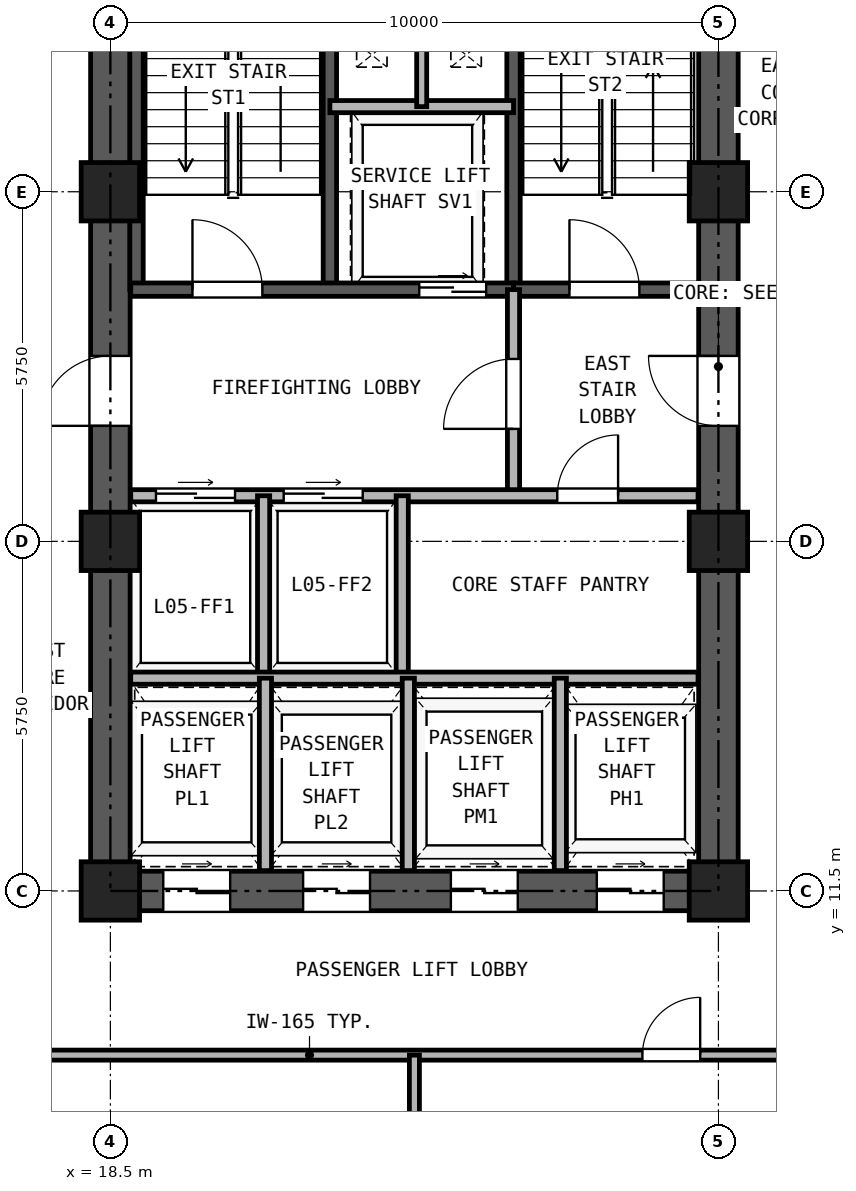
"""IFC4 building model, lengths in metres.
Left out: names, types, materials, properties, quantities, classifications, styles, units other than length and angle.
Written with IfcOpenShell. Run it as: python <this file> out.ifc"""

import sys

from ifc_helpers import new_model, si_unit, direction, frame, frame_2d, origin, origin_2d, place, context, subcontext, project, spatial, rectangle, hollow_rectangle, extrude, source, transform, mapped, element, fill, save


model = new_model("IFC4")
c1 = context("Model", 3, precision=1e-05, world=origin(), true_north=direction((0.0, 1.0)))
c2 = subcontext(c1, "Body", "Model", "MODEL_VIEW")
j1 = project(units=[si_unit("LENGTHUNIT", "METRE"), si_unit("PLANEANGLEUNIT", "RADIAN")], contexts=[c1])
p1 = place(None, origin())
s1 = spatial("IfcSite", under=j1, at=p1, CompositionType="ELEMENT")
p2 = place(p1, origin())
s2 = spatial("IfcBuilding", under=s1, at=p2, CompositionType="ELEMENT")
p3 = place(p2, frame((0.0, 0.0, 22.5)))
s3 = spatial("IfcBuildingStorey", under=s2, at=p3, CompositionType="ELEMENT", Elevation=22.5)
m1 = source(origin(), c2, "Body", "SweptSolid", [
    extrude(hollow_rectangle(XDim=0.96, YDim=0.96, WallThickness=0.06, at=origin_2d()), origin(), (0.0, 0.0, 1.0), 3.32),
])
for number, where, z_axis, x_axis in (
    (1, (18.5, 11.5, 0.0), (0.0, 0.0, 1.0), (1.0, 0.0, 0.0)),
    (2, (18.5, 17.25, 0.0), (0.0, 0.0, 1.0), (1.0, 0.0, 0.0)),
    (3, (18.5, 23.0, 0.0), (0.0, 0.0, 1.0), (1.0, 0.0, 0.0)),
    (4, (28.5, 11.5, 0.0), (0.0, 0.0, 1.0), (1.0, 0.0, 0.0)),
    (5, (28.5, 17.25, 0.0), (0.0, 0.0, 1.0), (1.0, 0.0, 0.0)),
    (6, (28.5, 23.0, 0.0), (0.0, 0.0, 1.0), (1.0, 0.0, 0.0)),
):
    element("IfcColumn", number, at=place(p3, frame(where, z_axis=z_axis, x_axis=x_axis)), inside=s3, PredefinedType="COLUMN", context=c2, shape_type="MappedRepresentation", body=[
        mapped(m1, transform((0.0, 0.0, 0.0), x_axis=(1.0, 0.0, 0.0), y_axis=(0.0, 1.0, 0.0), z_axis=(0.0, 0.0, 1.0), scale=1.0)),
    ])
p4 = place(p3, frame((18.175, 11.5, 0.0), z_axis=(0.0, 0.0, 1.0), x_axis=(1.0, 0.0, 0.0)))
e7 = element("IfcWall", 7, at=p4, inside=s3, PredefinedType="SHEAR", context=c2, shape_type="SweptSolid", body=[
    extrude(rectangle(XDim=10.65, YDim=0.65, at=frame_2d((5.325, 0.0))), origin(), (0.0, 0.0, 1.0), 3.32),
])
p5 = place(p4, frame((1.195, 0.0, 0.0)))
e8 = element("IfcOpeningElement", 8, at=p5, cuts=e7, PredefinedType="OPENING", context=c2, shape_type="SweptSolid", body=[
    extrude(rectangle(XDim=1.1, YDim=2.25, at=frame_2d((0.55, 1.125))), frame((0.0, 0.335, 0.0), z_axis=(0.0, -1.0, 0.0), x_axis=(1.0, 0.0, 0.0)), (0.0, 0.0, 1.0), 0.67),
])
p6 = place(p4, frame((3.495, 0.0, 0.0)))
e9 = element("IfcOpeningElement", 9, at=p6, cuts=e7, PredefinedType="OPENING", context=c2, shape_type="SweptSolid", body=[
    extrude(rectangle(XDim=1.1, YDim=2.25, at=frame_2d((0.55, 1.125))), frame((0.0, 0.335, 0.0), z_axis=(0.0, -1.0, 0.0), x_axis=(1.0, 0.0, 0.0)), (0.0, 0.0, 1.0), 0.67),
])
p7 = place(p4, frame((5.925, 0.0, 0.0)))
e10 = element("IfcOpeningElement", 10, at=p7, cuts=e7, PredefinedType="OPENING", context=c2, shape_type="SweptSolid", body=[
    extrude(rectangle(XDim=1.1, YDim=2.25, at=frame_2d((0.55, 1.125))), frame((0.0, 0.335, 0.0), z_axis=(0.0, -1.0, 0.0), x_axis=(1.0, 0.0, 0.0)), (0.0, 0.0, 1.0), 0.67),
])
p8 = place(p4, frame((8.325, 0.0, 0.0)))
e11 = element("IfcOpeningElement", 11, at=p8, cuts=e7, PredefinedType="OPENING", context=c2, shape_type="SweptSolid", body=[
    extrude(rectangle(XDim=1.1, YDim=2.25, at=frame_2d((0.55, 1.125))), frame((0.0, 0.335, 0.0), z_axis=(0.0, -1.0, 0.0), x_axis=(1.0, 0.0, 0.0)), (0.0, 0.0, 1.0), 0.67),
])
p9 = place(p3, frame((18.5, 11.825, 0.0), z_axis=(0.0, 0.0, 1.0), x_axis=(0.0, 1.0, 0.0)))
e12 = element("IfcWall", 12, at=p9, inside=s3, PredefinedType="SHEAR", context=c2, shape_type="SweptSolid", body=[
    extrude(rectangle(XDim=16.6, YDim=0.65, at=frame_2d((8.3, 0.0))), origin(), (0.0, 0.0, 1.0), 3.32),
])
p10 = place(p9, frame((7.325, 0.0, 0.0)))
e13 = element("IfcOpeningElement", 13, at=p10, cuts=e12, PredefinedType="OPENING", context=c2, shape_type="SweptSolid", body=[
    extrude(rectangle(XDim=1.15, YDim=2.2, at=frame_2d((0.575, 1.1))), frame((0.0, 0.335, 0.0), z_axis=(0.0, -1.0, 0.0), x_axis=(1.0, 0.0, 0.0)), (0.0, 0.0, 1.0), 0.67),
])
p11 = place(p3, frame((28.5, 11.825, 0.0), z_axis=(0.0, 0.0, 1.0), x_axis=(0.0, 1.0, 0.0)))
e14 = element("IfcWall", 14, at=p11, inside=s3, PredefinedType="SHEAR", context=c2, shape_type="SweptSolid", body=[
    extrude(rectangle(XDim=16.6, YDim=0.65, at=frame_2d((8.3, 0.0))), origin(), (0.0, 0.0, 1.0), 3.32),
])
p12 = place(p11, frame((7.325, 0.0, 0.0)))
e15 = element("IfcOpeningElement", 15, at=p12, cuts=e14, PredefinedType="OPENING", context=c2, shape_type="SweptSolid", body=[
    extrude(rectangle(XDim=1.15, YDim=2.2, at=frame_2d((0.575, 1.1))), frame((0.0, 0.335, 0.0), z_axis=(0.0, -1.0, 0.0), x_axis=(1.0, 0.0, 0.0)), (0.0, 0.0, 1.0), 0.67),
])
for number, where, z_axis, x_axis in (
    (16, (18.93, 21.39, 0.0), (0.0, 0.0, 1.0), (0.0, 1.0, 0.0)),
    (17, (22.11, 21.39, 0.0), (0.0, 0.0, 1.0), (0.0, 1.0, 0.0)),
    (18, (25.13, 21.39, 0.0), (0.0, 0.0, 1.0), (0.0, 1.0, 0.0)),
):
    element("IfcWall", number, at=place(p3, frame(where, z_axis=z_axis, x_axis=x_axis)), inside=s3, PredefinedType="SOLIDWALL", context=c2, shape_type="SweptSolid", body=[
        extrude(rectangle(XDim=7.11, YDim=0.22, at=frame_2d((3.555, 0.0))), origin(), (0.0, 0.0, 1.0), 3.32),
    ])
p13 = place(p3, frame((18.835, 21.39, 0.0), z_axis=(0.0, 0.0, 1.0), x_axis=(1.0, 0.0, 0.0)))
e19 = element("IfcWall", 19, at=p13, inside=s3, PredefinedType="SOLIDWALL", context=c2, shape_type="SweptSolid", body=[
    extrude(rectangle(XDim=6.295, YDim=0.22, at=frame_2d((3.147, 0.0))), origin(), (0.0, 0.0, 1.0), 3.32),
])
p14 = place(p13, frame((1.015, 0.0, 0.0)))
e20 = element("IfcOpeningElement", 20, at=p14, cuts=e19, PredefinedType="OPENING", context=c2, shape_type="SweptSolid", body=[
    extrude(rectangle(XDim=1.15, YDim=2.2, at=frame_2d((0.575, 1.1))), frame((0.0, 0.12, 0.0), z_axis=(0.0, -1.0, 0.0), x_axis=(1.0, 0.0, 0.0)), (0.0, 0.0, 1.0), 0.24),
])
p15 = place(p13, frame((4.745, 0.0, 0.0)))
e21 = element("IfcOpeningElement", 21, at=p15, cuts=e19, PredefinedType="OPENING", context=c2, shape_type="SweptSolid", body=[
    extrude(rectangle(XDim=1.1, YDim=2.25, at=frame_2d((0.55, 1.125))), frame((0.0, 0.12, 0.0), z_axis=(0.0, -1.0, 0.0), x_axis=(1.0, 0.0, 0.0)), (0.0, 0.0, 1.0), 0.24),
])
p16 = place(p3, frame((25.13, 21.39, 0.0), z_axis=(0.0, 0.0, 1.0), x_axis=(1.0, 0.0, 0.0)))
e22 = element("IfcWall", 22, at=p16, inside=s3, PredefinedType="SOLIDWALL", context=c2, shape_type="SweptSolid", body=[
    extrude(rectangle(XDim=3.035, YDim=0.22, at=frame_2d((1.518, 0.0))), origin(), (0.0, 0.0, 1.0), 3.32),
])
p17 = place(p16, frame((0.92, 0.0, 0.0)))
e23 = element("IfcOpeningElement", 23, at=p17, cuts=e22, PredefinedType="OPENING", context=c2, shape_type="SweptSolid", body=[
    extrude(rectangle(XDim=1.15, YDim=2.2, at=frame_2d((0.575, 1.1))), frame((0.0, 0.12, 0.0), z_axis=(0.0, -1.0, 0.0), x_axis=(1.0, 0.0, 0.0)), (0.0, 0.0, 1.0), 0.24),
])
p18 = place(p3, frame((22.11, 24.4, 0.0), z_axis=(0.0, 0.0, 1.0), x_axis=(1.0, 0.0, 0.0)))
e24 = element("IfcWall", 24, at=p18, inside=s3, PredefinedType="PARTITIONING", context=c2, shape_type="SweptSolid", body=[
    extrude(rectangle(XDim=3.02, YDim=0.2, at=frame_2d((1.51, 0.0))), origin(), (0.0, 0.0, 1.0), 3.32),
])
p19 = place(p3, frame((23.62, 24.4, 0.0), z_axis=(0.0, 0.0, 1.0), x_axis=(0.0, 1.0, 0.0)))
e25 = element("IfcWall", 25, at=p19, inside=s3, PredefinedType="PARTITIONING", context=c2, shape_type="SweptSolid", body=[
    extrude(rectangle(XDim=4.015, YDim=0.165, at=frame_2d((2.008, 0.0))), origin(), (0.0, 0.0, 1.0), 3.32),
])
p20 = place(p3, frame((25.13, 18.0, 0.0), z_axis=(0.0, 0.0, 1.0), x_axis=(0.0, 1.0, 0.0)))
e26 = element("IfcWall", 26, at=p20, inside=s3, PredefinedType="PARTITIONING", context=c2, shape_type="SweptSolid", body=[
    extrude(rectangle(XDim=3.39, YDim=0.2, at=frame_2d((1.695, 0.0))), origin(), (0.0, 0.0, 1.0), 3.32),
])
p21 = place(p20, frame((1.1, 0.0, 0.0)))
e27 = element("IfcOpeningElement", 27, at=p21, cuts=e26, PredefinedType="OPENING", context=c2, shape_type="SweptSolid", body=[
    extrude(rectangle(XDim=1.15, YDim=2.2, at=frame_2d((0.575, 1.1))), frame((0.0, 0.11, 0.0), z_axis=(0.0, -1.0, 0.0), x_axis=(1.0, 0.0, 0.0)), (0.0, 0.0, 1.0), 0.22),
])
p22 = place(p3, frame((18.835, 18.0, 0.0), z_axis=(0.0, 0.0, 1.0), x_axis=(1.0, 0.0, 0.0)))
e28 = element("IfcWall", 28, at=p22, inside=s3, PredefinedType="PARTITIONING", context=c2, shape_type="SweptSolid", body=[
    extrude(rectangle(XDim=9.33, YDim=0.2, at=frame_2d((4.665, 0.0))), origin(), (0.0, 0.0, 1.0), 3.32),
])
p23 = place(p22, frame((0.415, 0.0, 0.0)))
e29 = element("IfcOpeningElement", 29, at=p23, cuts=e28, PredefinedType="OPENING", context=c2, shape_type="SweptSolid", body=[
    extrude(rectangle(XDim=1.3, YDim=2.3, at=frame_2d((0.65, 1.15))), frame((0.0, 0.11, 0.0), z_axis=(0.0, -1.0, 0.0), x_axis=(1.0, 0.0, 0.0)), (0.0, 0.0, 1.0), 0.22),
])
p24 = place(p22, frame((2.515, 0.0, 0.0)))
e30 = element("IfcOpeningElement", 30, at=p24, cuts=e28, PredefinedType="OPENING", context=c2, shape_type="SweptSolid", body=[
    extrude(rectangle(XDim=1.3, YDim=2.3, at=frame_2d((0.65, 1.15))), frame((0.0, 0.11, 0.0), z_axis=(0.0, -1.0, 0.0), x_axis=(1.0, 0.0, 0.0)), (0.0, 0.0, 1.0), 0.22),
])
p25 = place(p22, frame((7.015, 0.0, 0.0)))
e31 = element("IfcOpeningElement", 31, at=p25, cuts=e28, PredefinedType="OPENING", context=c2, shape_type="SweptSolid", body=[
    extrude(rectangle(XDim=1.0, YDim=2.15, at=frame_2d((0.5, 1.075))), frame((0.0, 0.11, 0.0), z_axis=(0.0, -1.0, 0.0), x_axis=(1.0, 0.0, 0.0)), (0.0, 0.0, 1.0), 0.22),
])
for number, where, z_axis, x_axis in (
    (32, (21.02, 15.0, 0.0), (0.0, 0.0, 1.0), (0.0, 1.0, 0.0)),
    (33, (23.3, 15.0, 0.0), (0.0, 0.0, 1.0), (0.0, 1.0, 0.0)),
):
    element("IfcWall", number, at=place(p3, frame(where, z_axis=z_axis, x_axis=x_axis)), inside=s3, PredefinedType="PARTITIONING", context=c2, shape_type="SweptSolid", body=[
        extrude(rectangle(XDim=3.0, YDim=0.2, at=frame_2d((1.5, 0.0))), origin(), (0.0, 0.0, 1.0), 3.32),
    ])
p26 = place(p3, frame((18.835, 15.0, 0.0), z_axis=(0.0, 0.0, 1.0), x_axis=(1.0, 0.0, 0.0)))
e34 = element("IfcWall", 34, at=p26, inside=s3, PredefinedType="PARTITIONING", context=c2, shape_type="SweptSolid", body=[
    extrude(rectangle(XDim=9.33, YDim=0.2, at=frame_2d((4.665, 0.0))), origin(), (0.0, 0.0, 1.0), 3.32),
])
for number, where, z_axis, x_axis in (
    (35, (21.05, 11.835, 0.0), (0.0, 0.0, 1.0), (0.0, 1.0, 0.0)),
    (36, (23.4, 11.835, 0.0), (0.0, 0.0, 1.0), (0.0, 1.0, 0.0)),
    (37, (25.9, 11.835, 0.0), (0.0, 0.0, 1.0), (0.0, 1.0, 0.0)),
):
    element("IfcWall", number, at=place(p3, frame(where, z_axis=z_axis, x_axis=x_axis)), inside=s3, PredefinedType="PARTITIONING", context=c2, shape_type="SweptSolid", body=[
        extrude(rectangle(XDim=3.165, YDim=0.2, at=frame_2d((1.583, 0.0))), origin(), (0.0, 0.0, 1.0), 3.32),
    ])
p27 = place(p3, frame((8.2, 8.8, 0.0), z_axis=(0.0, 0.0, 1.0), x_axis=(1.0, 0.0, 0.0)))
e38 = element("IfcWall", 38, at=p27, inside=s3, PredefinedType="PARTITIONING", context=c2, shape_type="SweptSolid", body=[
    extrude(rectangle(XDim=30.6, YDim=0.165, at=frame_2d((15.3, 0.0))), origin(), (0.0, 0.0, 1.0), 3.32),
])
p28 = place(p27, frame((7.15, 0.0, 0.0)))
e39 = element("IfcOpeningElement", 39, at=p28, cuts=e38, PredefinedType="OPENING", context=c2, shape_type="SweptSolid", body=[
    extrude(rectangle(XDim=0.95, YDim=2.15, at=frame_2d((0.475, 1.075))), frame((0.0, 0.093, 0.0), z_axis=(0.0, -1.0, 0.0), x_axis=(1.0, 0.0, 0.0)), (0.0, 0.0, 1.0), 0.185),
])
p29 = place(p27, frame((19.05, 0.0, 0.0)))
e40 = element("IfcOpeningElement", 40, at=p29, cuts=e38, PredefinedType="OPENING", context=c2, shape_type="SweptSolid", body=[
    extrude(rectangle(XDim=0.95, YDim=2.15, at=frame_2d((0.475, 1.075))), frame((0.0, 0.093, 0.0), z_axis=(0.0, -1.0, 0.0), x_axis=(1.0, 0.0, 0.0)), (0.0, 0.0, 1.0), 0.185),
])
p30 = place(p27, frame((24.3, 0.0, 0.0)))
e41 = element("IfcOpeningElement", 41, at=p30, cuts=e38, PredefinedType="OPENING", context=c2, shape_type="SweptSolid", body=[
    extrude(rectangle(XDim=0.95, YDim=2.15, at=frame_2d((0.475, 1.075))), frame((0.0, 0.093, 0.0), z_axis=(0.0, -1.0, 0.0), x_axis=(1.0, 0.0, 0.0)), (0.0, 0.0, 1.0), 0.185),
])
p31 = place(p27, frame((26.5, 0.0, 0.0)))
e42 = element("IfcOpeningElement", 42, at=p31, cuts=e38, PredefinedType="OPENING", context=c2, shape_type="SweptSolid", body=[
    extrude(rectangle(XDim=0.92, YDim=2.1, at=frame_2d((0.46, 1.05))), frame((0.0, 0.093, 0.0), z_axis=(0.0, -1.0, 0.0), x_axis=(1.0, 0.0, 0.0)), (0.0, 0.0, 1.0), 0.185),
])
p32 = place(p27, frame((28.9, 0.0, 0.0)))
e43 = element("IfcOpeningElement", 43, at=p32, cuts=e38, PredefinedType="OPENING", context=c2, shape_type="SweptSolid", body=[
    extrude(rectangle(XDim=0.92, YDim=2.1, at=frame_2d((0.46, 1.05))), frame((0.0, 0.093, 0.0), z_axis=(0.0, -1.0, 0.0), x_axis=(1.0, 0.0, 0.0)), (0.0, 0.0, 1.0), 0.185),
])
p33 = place(p3, frame((23.5, 0.16, 0.0), z_axis=(0.0, 0.0, 1.0), x_axis=(0.0, 1.0, 0.0)))
e44 = element("IfcWall", 44, at=p33, inside=s3, PredefinedType="PARTITIONING", context=c2, shape_type="SweptSolid", body=[
    extrude(rectangle(XDim=8.64, YDim=0.165, at=frame_2d((4.32, 0.0))), origin(), (0.0, 0.0, 1.0), 3.32),
])
p34 = place(p14, frame((1.15, 0.0, 0.0), z_axis=(0.0, 0.0, 1.0), x_axis=(-1.0, 0.0, 0.0)))
e45 = element("IfcDoor", 45, at=p34, inside=s3, OperationType="SINGLE_SWING_LEFT", PredefinedType="DOOR", context=c2, shape_type="SweptSolid", body=[
    extrude(rectangle(XDim=1.15, YDim=2.2, at=frame_2d((0.575, 1.1))), frame((0.0, 0.025, 0.0), z_axis=(0.0, -1.0, 0.0), x_axis=(1.0, 0.0, 0.0)), (0.0, 0.0, 1.0), 0.05),
])
fill(e20, e45)
p35 = place(p17, frame((1.15, 0.0, 0.0), z_axis=(0.0, 0.0, 1.0), x_axis=(-1.0, 0.0, 0.0)))
e46 = element("IfcDoor", 46, at=p35, inside=s3, OperationType="SINGLE_SWING_LEFT", PredefinedType="DOOR", context=c2, shape_type="SweptSolid", body=[
    extrude(rectangle(XDim=1.15, YDim=2.2, at=frame_2d((0.575, 1.1))), frame((0.0, 0.025, 0.0), z_axis=(0.0, -1.0, 0.0), x_axis=(1.0, 0.0, 0.0)), (0.0, 0.0, 1.0), 0.05),
])
fill(e23, e46)
p36 = place(p15, frame((1.1, 0.0, 0.0), z_axis=(0.0, 0.0, 1.0), x_axis=(-1.0, 0.0, 0.0)))
e47 = element("IfcDoor", 47, at=p36, inside=s3, OperationType="DOUBLE_DOOR_SLIDING", PredefinedType="DOOR", context=c2, shape_type="SweptSolid", body=[
    extrude(rectangle(XDim=1.1, YDim=2.25, at=frame_2d((0.55, 1.125))), frame((0.0, 0.025, 0.0), z_axis=(0.0, -1.0, 0.0), x_axis=(1.0, 0.0, 0.0)), (0.0, 0.0, 1.0), 0.05),
])
fill(e21, e47)
p37 = place(p21, origin())
e48 = element("IfcDoor", 48, at=p37, inside=s3, OperationType="SINGLE_SWING_LEFT", PredefinedType="DOOR", context=c2, shape_type="SweptSolid", body=[
    extrude(rectangle(XDim=1.15, YDim=2.2, at=frame_2d((0.575, 1.1))), frame((0.0, 0.025, 0.0), z_axis=(0.0, -1.0, 0.0), x_axis=(1.0, 0.0, 0.0)), (0.0, 0.0, 1.0), 0.05),
])
fill(e27, e48)
p38 = place(p23, origin())
e49 = element("IfcDoor", 49, at=p38, inside=s3, OperationType="DOUBLE_DOOR_SLIDING", PredefinedType="DOOR", context=c2, shape_type="SweptSolid", body=[
    extrude(rectangle(XDim=1.3, YDim=2.3, at=frame_2d((0.65, 1.15))), frame((0.0, 0.025, 0.0), z_axis=(0.0, -1.0, 0.0), x_axis=(1.0, 0.0, 0.0)), (0.0, 0.0, 1.0), 0.05),
])
fill(e29, e49)
p39 = place(p24, origin())
e50 = element("IfcDoor", 50, at=p39, inside=s3, OperationType="DOUBLE_DOOR_SLIDING", PredefinedType="DOOR", context=c2, shape_type="SweptSolid", body=[
    extrude(rectangle(XDim=1.3, YDim=2.3, at=frame_2d((0.65, 1.15))), frame((0.0, 0.025, 0.0), z_axis=(0.0, -1.0, 0.0), x_axis=(1.0, 0.0, 0.0)), (0.0, 0.0, 1.0), 0.05),
])
fill(e30, e50)
p40 = place(p25, frame((1.0, 0.0, 0.0), z_axis=(0.0, 0.0, 1.0), x_axis=(-1.0, 0.0, 0.0)))
e51 = element("IfcDoor", 51, at=p40, inside=s3, OperationType="SINGLE_SWING_RIGHT", PredefinedType="DOOR", context=c2, shape_type="SweptSolid", body=[
    extrude(rectangle(XDim=1.0, YDim=2.15, at=frame_2d((0.5, 1.075))), frame((0.0, 0.025, 0.0), z_axis=(0.0, -1.0, 0.0), x_axis=(1.0, 0.0, 0.0)), (0.0, 0.0, 1.0), 0.05),
])
fill(e31, e51)
p41 = place(p10, frame((1.15, 0.0, 0.0), z_axis=(0.0, 0.0, 1.0), x_axis=(-1.0, 0.0, 0.0)))
e52 = element("IfcDoor", 52, at=p41, inside=s3, OperationType="SINGLE_SWING_LEFT", PredefinedType="DOOR", context=c2, shape_type="SweptSolid", body=[
    extrude(rectangle(XDim=1.15, YDim=2.2, at=frame_2d((0.575, 1.1))), frame((0.0, 0.025, 0.0), z_axis=(0.0, -1.0, 0.0), x_axis=(1.0, 0.0, 0.0)), (0.0, 0.0, 1.0), 0.05),
])
fill(e13, e52)
p42 = place(p12, origin())
e53 = element("IfcDoor", 53, at=p42, inside=s3, OperationType="SINGLE_SWING_RIGHT", PredefinedType="DOOR", context=c2, shape_type="SweptSolid", body=[
    extrude(rectangle(XDim=1.15, YDim=2.2, at=frame_2d((0.575, 1.1))), frame((0.0, 0.025, 0.0), z_axis=(0.0, -1.0, 0.0), x_axis=(1.0, 0.0, 0.0)), (0.0, 0.0, 1.0), 0.05),
])
fill(e15, e53)
p43 = place(p5, frame((1.1, 0.0, 0.0), z_axis=(0.0, 0.0, 1.0), x_axis=(-1.0, 0.0, 0.0)))
e54 = element("IfcDoor", 54, at=p43, inside=s3, OperationType="DOUBLE_DOOR_SLIDING", PredefinedType="DOOR", context=c2, shape_type="SweptSolid", body=[
    extrude(rectangle(XDim=1.1, YDim=2.25, at=frame_2d((0.55, 1.125))), frame((0.0, 0.025, 0.0), z_axis=(0.0, -1.0, 0.0), x_axis=(1.0, 0.0, 0.0)), (0.0, 0.0, 1.0), 0.05),
])
fill(e8, e54)
p44 = place(p6, frame((1.1, 0.0, 0.0), z_axis=(0.0, 0.0, 1.0), x_axis=(-1.0, 0.0, 0.0)))
e55 = element("IfcDoor", 55, at=p44, inside=s3, OperationType="DOUBLE_DOOR_SLIDING", PredefinedType="DOOR", context=c2, shape_type="SweptSolid", body=[
    extrude(rectangle(XDim=1.1, YDim=2.25, at=frame_2d((0.55, 1.125))), frame((0.0, 0.025, 0.0), z_axis=(0.0, -1.0, 0.0), x_axis=(1.0, 0.0, 0.0)), (0.0, 0.0, 1.0), 0.05),
])
fill(e9, e55)
p45 = place(p7, frame((1.1, 0.0, 0.0), z_axis=(0.0, 0.0, 1.0), x_axis=(-1.0, 0.0, 0.0)))
e56 = element("IfcDoor", 56, at=p45, inside=s3, OperationType="DOUBLE_DOOR_SLIDING", PredefinedType="DOOR", context=c2, shape_type="SweptSolid", body=[
    extrude(rectangle(XDim=1.1, YDim=2.25, at=frame_2d((0.55, 1.125))), frame((0.0, 0.025, 0.0), z_axis=(0.0, -1.0, 0.0), x_axis=(1.0, 0.0, 0.0)), (0.0, 0.0, 1.0), 0.05),
])
fill(e10, e56)
p46 = place(p8, frame((1.1, 0.0, 0.0), z_axis=(0.0, 0.0, 1.0), x_axis=(-1.0, 0.0, 0.0)))
e57 = element("IfcDoor", 57, at=p46, inside=s3, OperationType="DOUBLE_DOOR_SLIDING", PredefinedType="DOOR", context=c2, shape_type="SweptSolid", body=[
    extrude(rectangle(XDim=1.1, YDim=2.25, at=frame_2d((0.55, 1.125))), frame((0.0, 0.025, 0.0), z_axis=(0.0, -1.0, 0.0), x_axis=(1.0, 0.0, 0.0)), (0.0, 0.0, 1.0), 0.05),
])
fill(e11, e57)
p47 = place(p29, frame((0.95, 0.0, 0.0), z_axis=(0.0, 0.0, 1.0), x_axis=(-1.0, 0.0, 0.0)))
e58 = element("IfcDoor", 58, at=p47, inside=s3, OperationType="SINGLE_SWING_RIGHT", PredefinedType="DOOR", context=c2, shape_type="SweptSolid", body=[
    extrude(rectangle(XDim=0.95, YDim=2.15, at=frame_2d((0.475, 1.075))), frame((0.0, 0.025, 0.0), z_axis=(0.0, -1.0, 0.0), x_axis=(1.0, 0.0, 0.0)), (0.0, 0.0, 1.0), 0.05),
])
fill(e40, e58)
save(model, sys.argv[1])
